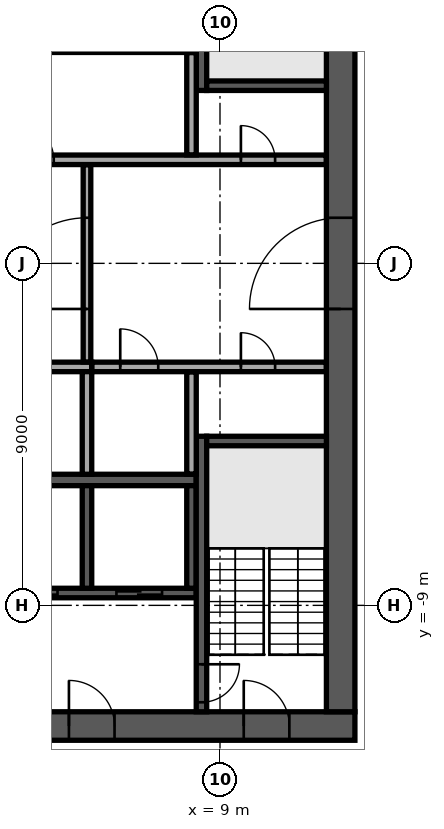
"""IFC4 building model, lengths in metres.
Left out: names, types, materials, properties, quantities, classifications, styles, units other than length and angle.
Written with IfcOpenShell. Run it as: python <this file> out.ifc"""

import sys

from ifc_helpers import new_model, si_unit, direction, frame, frame_2d, origin, place, context, subcontext, project, spatial, rectangle, extrude, element, fill, save


model = new_model("IFC4")
c1 = context("Model", 3, precision=1e-05, world=origin(), true_north=direction((0.0, 1.0)))
c2 = subcontext(c1, "Body", "Model", "MODEL_VIEW")
j1 = project(units=[si_unit("LENGTHUNIT", "METRE"), si_unit("PLANEANGLEUNIT", "RADIAN")], contexts=[c1])
p1 = place(None, origin())
s1 = spatial("IfcSite", under=j1, at=p1, CompositionType="ELEMENT")
p2 = place(p1, origin())
s2 = spatial("IfcBuilding", under=s1, at=p2, CompositionType="ELEMENT")
p3 = place(p2, frame((0.0, 0.0, 274.9)))
s3 = spatial("IfcBuildingStorey", under=s2, at=p3, CompositionType="ELEMENT", Elevation=274.9)
p4 = place(p3, frame((-12.55, -12.175, 0.0), z_axis=(0.0, 0.0, 1.0), x_axis=(1.0, 0.0, 0.0)))
e1 = element("IfcWall", 1, at=p4, inside=s3, PredefinedType="SHEAR", context=c2, shape_type="SweptSolid", body=[
    extrude(rectangle(XDim=25.1, YDim=0.75, at=frame_2d((12.55, 0.0))), origin(), (0.0, 0.0, 1.0), 3.64),
])
p5 = place(p4, frame((7.45, 0.0, 0.0)))
e2 = element("IfcOpeningElement", 2, at=p5, cuts=e1, PredefinedType="OPENING", context=c2, shape_type="SweptSolid", body=[
    extrude(rectangle(XDim=2.0, YDim=2.1, at=frame_2d((1.0, 1.05))), frame((0.0, 0.385, 0.0), z_axis=(0.0, -1.0, 0.0), x_axis=(1.0, 0.0, 0.0)), (0.0, 0.0, 1.0), 0.77),
])
p6 = place(p4, frame((17.575, 0.0, 0.0)))
e3 = element("IfcOpeningElement", 3, at=p6, cuts=e1, PredefinedType="OPENING", context=c2, shape_type="SweptSolid", body=[
    extrude(rectangle(XDim=1.2, YDim=2.1, at=frame_2d((0.6, 1.05))), frame((0.0, 0.385, 0.0), z_axis=(0.0, -1.0, 0.0), x_axis=(1.0, 0.0, 0.0)), (0.0, 0.0, 1.0), 0.77),
])
p7 = place(p4, frame((1.725, 0.0, 0.0)))
e4 = element("IfcOpeningElement", 4, at=p7, cuts=e1, PredefinedType="OPENING", context=c2, shape_type="SweptSolid", body=[
    extrude(rectangle(XDim=1.2, YDim=2.1, at=frame_2d((0.6, 1.05))), frame((0.0, 0.385, 0.0), z_axis=(0.0, -1.0, 0.0), x_axis=(1.0, 0.0, 0.0)), (0.0, 0.0, 1.0), 0.77),
])
p8 = place(p4, frame((22.175, 0.0, 0.0)))
e5 = element("IfcOpeningElement", 5, at=p8, cuts=e1, PredefinedType="OPENING", context=c2, shape_type="SweptSolid", body=[
    extrude(rectangle(XDim=1.2, YDim=2.1, at=frame_2d((0.6, 1.05))), frame((0.0, 0.385, 0.0), z_axis=(0.0, -1.0, 0.0), x_axis=(1.0, 0.0, 0.0)), (0.0, 0.0, 1.0), 0.77),
])
p9 = place(p3, frame((12.175, -11.8, 0.0), z_axis=(0.0, 0.0, 1.0), x_axis=(0.0, 1.0, 0.0)))
e6 = element("IfcWall", 6, at=p9, inside=s3, PredefinedType="SHEAR", context=c2, shape_type="SweptSolid", body=[
    extrude(rectangle(XDim=23.6, YDim=0.75, at=frame_2d((11.8, 0.0))), origin(), (0.0, 0.0, 1.0), 3.64),
])
p10 = place(p9, frame((10.6, 0.0, 0.0)))
e7 = element("IfcOpeningElement", 7, at=p10, cuts=e6, PredefinedType="OPENING", context=c2, shape_type="SweptSolid", body=[
    extrude(rectangle(XDim=2.4, YDim=2.4, at=frame_2d((1.2, 1.2))), frame((0.0, 0.385, 0.0), z_axis=(0.0, -1.0, 0.0), x_axis=(1.0, 0.0, 0.0)), (0.0, 0.0, 1.0), 0.77),
])
p11 = place(p3, frame((-8.375, 5.7, 0.0), z_axis=(0.0, 0.0, 1.0), x_axis=(1.0, 0.0, 0.0)))
e8 = element("IfcWall", 8, at=p11, inside=s3, PredefinedType="SOLIDWALL", context=c2, shape_type="SweptSolid", body=[
    extrude(rectangle(XDim=16.75, YDim=0.3, at=frame_2d((8.375, 0.0))), origin(), (0.0, 0.0, 1.0), 3.64),
])
p12 = place(p3, frame((-2.875, -5.7, 0.0), z_axis=(0.0, 0.0, 1.0), x_axis=(1.0, 0.0, 0.0)))
e9 = element("IfcWall", 9, at=p12, inside=s3, PredefinedType="SOLIDWALL", context=c2, shape_type="SweptSolid", body=[
    extrude(rectangle(XDim=11.25, YDim=0.3, at=frame_2d((5.625, 0.0))), origin(), (0.0, 0.0, 1.0), 3.64),
])
p13 = place(p3, frame((2.625, -2.725, 0.0), z_axis=(0.0, 0.0, 1.0), x_axis=(1.0, 0.0, 0.0)))
e10 = element("IfcWall", 10, at=p13, inside=s3, PredefinedType="SOLIDWALL", context=c2, shape_type="SweptSolid", body=[
    extrude(rectangle(XDim=3.0, YDim=0.25, at=frame_2d((1.5, 0.0))), origin(), (0.0, 0.0, 1.0), 3.64),
])
p14 = place(p3, frame((5.5, -5.55, 0.0), z_axis=(0.0, 0.0, 1.0), x_axis=(0.0, 1.0, 0.0)))
e11 = element("IfcWall", 11, at=p14, inside=s3, PredefinedType="SOLIDWALL", context=c2, shape_type="SweptSolid", body=[
    extrude(rectangle(XDim=2.7, YDim=0.25, at=frame_2d((1.35, 0.0))), origin(), (0.0, 0.0, 1.0), 3.64),
])
p15 = place(p3, frame((-2.875, -8.675, 0.0), z_axis=(0.0, 0.0, 1.0), x_axis=(1.0, 0.0, 0.0)))
e12 = element("IfcWall", 12, at=p15, inside=s3, PredefinedType="SOLIDWALL", context=c2, shape_type="SweptSolid", body=[
    extrude(rectangle(XDim=11.25, YDim=0.25, at=frame_2d((5.625, 0.0))), origin(), (0.0, 0.0, 1.0), 3.64),
])
p16 = place(p15, frame((0.9, 0.0, 0.0)))
e13 = element("IfcOpeningElement", 13, at=p16, cuts=e12, PredefinedType="OPENING", context=c2, shape_type="SweptSolid", body=[
    extrude(rectangle(XDim=1.2, YDim=2.1, at=frame_2d((0.6, 1.05))), frame((0.0, 0.135, 0.0), z_axis=(0.0, -1.0, 0.0), x_axis=(1.0, 0.0, 0.0)), (0.0, 0.0, 1.0), 0.27),
])
p17 = place(p15, frame((3.65, 0.0, 0.0)))
e14 = element("IfcOpeningElement", 14, at=p17, cuts=e12, PredefinedType="OPENING", context=c2, shape_type="SweptSolid", body=[
    extrude(rectangle(XDim=1.2, YDim=2.1, at=frame_2d((0.6, 1.05))), frame((0.0, 0.135, 0.0), z_axis=(0.0, -1.0, 0.0), x_axis=(1.0, 0.0, 0.0)), (0.0, 0.0, 1.0), 0.27),
])
p18 = place(p15, frame((6.4, 0.0, 0.0)))
e15 = element("IfcOpeningElement", 15, at=p18, cuts=e12, PredefinedType="OPENING", context=c2, shape_type="SweptSolid", body=[
    extrude(rectangle(XDim=1.2, YDim=2.1, at=frame_2d((0.6, 1.05))), frame((0.0, 0.135, 0.0), z_axis=(0.0, -1.0, 0.0), x_axis=(1.0, 0.0, 0.0)), (0.0, 0.0, 1.0), 0.27),
])
p19 = place(p15, frame((9.15, 0.0, 0.0)))
e16 = element("IfcOpeningElement", 16, at=p19, cuts=e12, PredefinedType="OPENING", context=c2, shape_type="SweptSolid", body=[
    extrude(rectangle(XDim=1.2, YDim=2.1, at=frame_2d((0.6, 1.05))), frame((0.0, 0.135, 0.0), z_axis=(0.0, -1.0, 0.0), x_axis=(1.0, 0.0, 0.0)), (0.0, 0.0, 1.0), 0.27),
])
for number, where, z_axis, x_axis in (
    (17, (5.5, -8.55, 0.0), (0.0, 0.0, 1.0), (0.0, 1.0, 0.0)),
    (18, (8.25, -8.55, 0.0), (0.0, 0.0, 1.0), (0.0, 1.0, 0.0)),
):
    element("IfcWall", number, at=place(p3, frame(where, z_axis=z_axis, x_axis=x_axis)), inside=s3, PredefinedType="SOLIDWALL", context=c2, shape_type="SweptSolid", body=[
        extrude(rectangle(XDim=2.7, YDim=0.25, at=frame_2d((1.35, 0.0))), origin(), (0.0, 0.0, 1.0), 3.64),
    ])
p20 = place(p3, frame((8.512, 4.55, 0.0), z_axis=(0.0, 0.0, 1.0), x_axis=(0.0, 1.0, 0.0)))
e19 = element("IfcWall", 19, at=p20, inside=s3, PredefinedType="SOLIDWALL", context=c2, shape_type="SweptSolid", body=[
    extrude(rectangle(XDim=7.25, YDim=0.275, at=frame_2d((3.625, 0.0))), origin(), (0.0, 0.0, 1.0), 3.64),
])
p21 = place(p20, frame((6.0, 0.0, 0.0)))
e20 = element("IfcOpeningElement", 20, at=p21, cuts=e19, PredefinedType="OPENING", context=c2, shape_type="SweptSolid", body=[
    extrude(rectangle(XDim=1.0, YDim=2.1, at=frame_2d((0.5, 1.05))), frame((0.0, 0.147, 0.0), z_axis=(0.0, -1.0, 0.0), x_axis=(1.0, 0.0, 0.0)), (0.0, 0.0, 1.0), 0.295),
])
p22 = place(p3, frame((8.65, 4.675, 0.0), z_axis=(0.0, 0.0, 1.0), x_axis=(1.0, 0.0, 0.0)))
e21 = element("IfcWall", 21, at=p22, inside=s3, PredefinedType="SOLIDWALL", context=c2, shape_type="SweptSolid", body=[
    extrude(rectangle(XDim=3.15, YDim=0.25, at=frame_2d((1.575, 0.0))), origin(), (0.0, 0.0, 1.0), 3.64),
])
p23 = place(p3, frame((8.512, -4.55, 0.0), z_axis=(0.0, 0.0, 1.0), x_axis=(0.0, -1.0, 0.0)))
e22 = element("IfcWall", 22, at=p23, inside=s3, PredefinedType="SOLIDWALL", context=c2, shape_type="SweptSolid", body=[
    extrude(rectangle(XDim=7.25, YDim=0.275, at=frame_2d((3.625, 0.0))), origin(), (0.0, 0.0, 1.0), 3.64),
])
p24 = place(p23, frame((6.0, 0.0, 0.0)))
e23 = element("IfcOpeningElement", 23, at=p24, cuts=e22, PredefinedType="OPENING", context=c2, shape_type="SweptSolid", body=[
    extrude(rectangle(XDim=1.0, YDim=2.1, at=frame_2d((0.5, 1.05))), frame((0.0, 0.147, 0.0), z_axis=(0.0, -1.0, 0.0), x_axis=(1.0, 0.0, 0.0)), (0.0, 0.0, 1.0), 0.295),
])
p25 = place(p3, frame((8.65, -4.675, 0.0), z_axis=(0.0, 0.0, 1.0), x_axis=(1.0, 0.0, 0.0)))
e24 = element("IfcWall", 24, at=p25, inside=s3, PredefinedType="SOLIDWALL", context=c2, shape_type="SweptSolid", body=[
    extrude(rectangle(XDim=3.15, YDim=0.25, at=frame_2d((1.575, 0.0))), origin(), (0.0, 0.0, 1.0), 3.64),
])
p26 = place(p3, frame((8.25, -5.545, 0.0), z_axis=(0.0, 0.0, 1.0), x_axis=(0.0, 1.0, 0.0)))
e25 = element("IfcWall", 25, at=p26, inside=s3, PredefinedType="PARTITIONING", context=c2, shape_type="SweptSolid", body=[
    extrude(rectangle(XDim=2.69, YDim=0.25, at=frame_2d((1.345, 0.0))), origin(), (0.0, 0.0, 1.0), 3.64),
])
p27 = place(p3, frame((5.63, -2.725, 0.0), z_axis=(0.0, 0.0, 1.0), x_axis=(1.0, 0.0, 0.0)))
e26 = element("IfcWall", 26, at=p27, inside=s3, PredefinedType="PARTITIONING", context=c2, shape_type="SweptSolid", body=[
    extrude(rectangle(XDim=6.165, YDim=0.25, at=frame_2d((3.083, 0.0))), origin(), (0.0, 0.0, 1.0), 3.64),
])
p28 = place(p27, frame((0.745, 0.0, 0.0)))
e27 = element("IfcOpeningElement", 27, at=p28, cuts=e26, PredefinedType="OPENING", context=c2, shape_type="SweptSolid", body=[
    extrude(rectangle(XDim=1.0, YDim=2.1, at=frame_2d((0.5, 1.05))), frame((0.0, 0.135, 0.0), z_axis=(0.0, -1.0, 0.0), x_axis=(1.0, 0.0, 0.0)), (0.0, 0.0, 1.0), 0.27),
])
p29 = place(p27, frame((3.92, 0.0, 0.0)))
e28 = element("IfcOpeningElement", 28, at=p29, cuts=e26, PredefinedType="OPENING", context=c2, shape_type="SweptSolid", body=[
    extrude(rectangle(XDim=0.9, YDim=2.1, at=frame_2d((0.45, 1.05))), frame((0.0, 0.135, 0.0), z_axis=(0.0, -1.0, 0.0), x_axis=(1.0, 0.0, 0.0)), (0.0, 0.0, 1.0), 0.27),
])
p30 = place(p3, frame((5.5, -2.595, 0.0), z_axis=(0.0, 0.0, 1.0), x_axis=(0.0, 1.0, 0.0)))
e29 = element("IfcWall", 29, at=p30, inside=s3, PredefinedType="PARTITIONING", context=c2, shape_type="SweptSolid", body=[
    extrude(rectangle(XDim=5.19, YDim=0.2, at=frame_2d((2.595, 0.0))), origin(), (0.0, 0.0, 1.0), 3.64),
])
p31 = place(p30, frame((1.395, 0.0, 0.0)))
e30 = element("IfcOpeningElement", 30, at=p31, cuts=e29, PredefinedType="OPENING", context=c2, shape_type="SweptSolid", body=[
    extrude(rectangle(XDim=2.4, YDim=2.4, at=frame_2d((1.2, 1.2))), frame((0.0, 0.11, 0.0), z_axis=(0.0, -1.0, 0.0), x_axis=(1.0, 0.0, 0.0)), (0.0, 0.0, 1.0), 0.22),
])
p32 = place(p3, frame((-11.795, 2.725, 0.0), z_axis=(0.0, 0.0, 1.0), x_axis=(1.0, 0.0, 0.0)))
e31 = element("IfcWall", 31, at=p32, inside=s3, PredefinedType="PARTITIONING", context=c2, shape_type="SweptSolid", body=[
    extrude(rectangle(XDim=23.59, YDim=0.25, at=frame_2d((11.795, 0.0))), origin(), (0.0, 0.0, 1.0), 3.64),
])
p33 = place(p32, frame((21.345, 0.0, 0.0)))
e32 = element("IfcOpeningElement", 32, at=p33, cuts=e31, PredefinedType="OPENING", context=c2, shape_type="SweptSolid", body=[
    extrude(rectangle(XDim=0.9, YDim=2.1, at=frame_2d((0.45, 1.05))), frame((0.0, 0.135, 0.0), z_axis=(0.0, -1.0, 0.0), x_axis=(1.0, 0.0, 0.0)), (0.0, 0.0, 1.0), 0.27),
])
p34 = place(p32, frame((1.345, 0.0, 0.0)))
e33 = element("IfcOpeningElement", 33, at=p34, cuts=e31, PredefinedType="OPENING", context=c2, shape_type="SweptSolid", body=[
    extrude(rectangle(XDim=0.9, YDim=2.1, at=frame_2d((0.45, 1.05))), frame((0.0, 0.135, 0.0), z_axis=(0.0, -1.0, 0.0), x_axis=(1.0, 0.0, 0.0)), (0.0, 0.0, 1.0), 0.27),
])
p35 = place(p32, frame((4.32, 0.0, 0.0)))
e34 = element("IfcOpeningElement", 34, at=p35, cuts=e31, PredefinedType="OPENING", context=c2, shape_type="SweptSolid", body=[
    extrude(rectangle(XDim=1.2, YDim=2.1, at=frame_2d((0.6, 1.05))), frame((0.0, 0.135, 0.0), z_axis=(0.0, -1.0, 0.0), x_axis=(1.0, 0.0, 0.0)), (0.0, 0.0, 1.0), 0.27),
])
p36 = place(p32, frame((15.42, 0.0, 0.0)))
e35 = element("IfcOpeningElement", 35, at=p36, cuts=e31, PredefinedType="OPENING", context=c2, shape_type="SweptSolid", body=[
    extrude(rectangle(XDim=1.0, YDim=2.1, at=frame_2d((0.5, 1.05))), frame((0.0, 0.135, 0.0), z_axis=(0.0, -1.0, 0.0), x_axis=(1.0, 0.0, 0.0)), (0.0, 0.0, 1.0), 0.27),
])
p37 = place(p3, frame((8.25, 2.855, 0.0), z_axis=(0.0, 0.0, 1.0), x_axis=(0.0, 1.0, 0.0)))
e36 = element("IfcWall", 36, at=p37, inside=s3, PredefinedType="PARTITIONING", context=c2, shape_type="SweptSolid", body=[
    extrude(rectangle(XDim=2.69, YDim=0.25, at=frame_2d((1.345, 0.0))), origin(), (0.0, 0.0, 1.0), 3.64),
])
p38 = place(p3, frame((9.233, -32.479, 0.0), z_axis=(0.0, 0.0, 1.0), x_axis=(0.469468429065, 0.882949259081, 0.0)))
e37 = element("IfcWall", 37, at=p38, inside=s3, PredefinedType="STANDARD", context=c2, shape_type="SweptSolid", body=[
    extrude(rectangle(XDim=48.686, YDim=0.6, at=frame_2d((24.343, 0.0))), origin(), (0.0, 0.0, 1.0), 3.64),
])
p39 = place(p38, frame((1.213, 0.0, 0.9)))
e38 = element("IfcOpeningElement", 38, at=p39, cuts=e37, PredefinedType="OPENING", context=c2, shape_type="SweptSolid", body=[
    extrude(rectangle(XDim=2.0, YDim=2.1, at=frame_2d((1.0, 1.05))), frame((0.0, 0.31, 0.0), z_axis=(0.0, -1.0, 0.0), x_axis=(1.0, 0.0, 0.0)), (0.0, 0.0, 1.0), 0.62),
])
p40 = place(p38, frame((5.639, 0.0, 0.9)))
e39 = element("IfcOpeningElement", 39, at=p40, cuts=e37, PredefinedType="OPENING", context=c2, shape_type="SweptSolid", body=[
    extrude(rectangle(XDim=2.0, YDim=2.1, at=frame_2d((1.0, 1.05))), frame((0.0, 0.31, 0.0), z_axis=(0.0, -1.0, 0.0), x_axis=(1.0, 0.0, 0.0)), (0.0, 0.0, 1.0), 0.62),
])
p41 = place(p38, frame((10.065, 0.0, 0.9)))
e40 = element("IfcOpeningElement", 40, at=p41, cuts=e37, PredefinedType="OPENING", context=c2, shape_type="SweptSolid", body=[
    extrude(rectangle(XDim=2.0, YDim=2.1, at=frame_2d((1.0, 1.05))), frame((0.0, 0.31, 0.0), z_axis=(0.0, -1.0, 0.0), x_axis=(1.0, 0.0, 0.0)), (0.0, 0.0, 1.0), 0.62),
])
p42 = place(p38, frame((14.491, 0.0, 0.9)))
e41 = element("IfcOpeningElement", 41, at=p42, cuts=e37, PredefinedType="OPENING", context=c2, shape_type="SweptSolid", body=[
    extrude(rectangle(XDim=2.0, YDim=2.1, at=frame_2d((1.0, 1.05))), frame((0.0, 0.31, 0.0), z_axis=(0.0, -1.0, 0.0), x_axis=(1.0, 0.0, 0.0)), (0.0, 0.0, 1.0), 0.62),
])
p43 = place(p38, frame((18.917, 0.0, 0.9)))
e42 = element("IfcOpeningElement", 42, at=p43, cuts=e37, PredefinedType="OPENING", context=c2, shape_type="SweptSolid", body=[
    extrude(rectangle(XDim=2.0, YDim=2.1, at=frame_2d((1.0, 1.05))), frame((0.0, 0.31, 0.0), z_axis=(0.0, -1.0, 0.0), x_axis=(1.0, 0.0, 0.0)), (0.0, 0.0, 1.0), 0.62),
])
p44 = place(p38, frame((23.343, 0.0, 0.9)))
e43 = element("IfcOpeningElement", 43, at=p44, cuts=e37, PredefinedType="OPENING", context=c2, shape_type="SweptSolid", body=[
    extrude(rectangle(XDim=2.0, YDim=2.1, at=frame_2d((1.0, 1.05))), frame((0.0, 0.31, 0.0), z_axis=(0.0, -1.0, 0.0), x_axis=(1.0, 0.0, 0.0)), (0.0, 0.0, 1.0), 0.62),
])
p45 = place(p38, frame((27.769, 0.0, 0.9)))
e44 = element("IfcOpeningElement", 44, at=p45, cuts=e37, PredefinedType="OPENING", context=c2, shape_type="SweptSolid", body=[
    extrude(rectangle(XDim=2.0, YDim=2.1, at=frame_2d((1.0, 1.05))), frame((0.0, 0.31, 0.0), z_axis=(0.0, -1.0, 0.0), x_axis=(1.0, 0.0, 0.0)), (0.0, 0.0, 1.0), 0.62),
])
p46 = place(p38, frame((32.195, 0.0, 0.9)))
e45 = element("IfcOpeningElement", 45, at=p46, cuts=e37, PredefinedType="OPENING", context=c2, shape_type="SweptSolid", body=[
    extrude(rectangle(XDim=2.0, YDim=2.1, at=frame_2d((1.0, 1.05))), frame((0.0, 0.31, 0.0), z_axis=(0.0, -1.0, 0.0), x_axis=(1.0, 0.0, 0.0)), (0.0, 0.0, 1.0), 0.62),
])
p47 = place(p38, frame((36.621, 0.0, 0.9)))
e46 = element("IfcOpeningElement", 46, at=p47, cuts=e37, PredefinedType="OPENING", context=c2, shape_type="SweptSolid", body=[
    extrude(rectangle(XDim=2.0, YDim=2.1, at=frame_2d((1.0, 1.05))), frame((0.0, 0.31, 0.0), z_axis=(0.0, -1.0, 0.0), x_axis=(1.0, 0.0, 0.0)), (0.0, 0.0, 1.0), 0.62),
])
p48 = place(p38, frame((41.047, 0.0, 0.9)))
e47 = element("IfcOpeningElement", 47, at=p48, cuts=e37, PredefinedType="OPENING", context=c2, shape_type="SweptSolid", body=[
    extrude(rectangle(XDim=2.0, YDim=2.1, at=frame_2d((1.0, 1.05))), frame((0.0, 0.31, 0.0), z_axis=(0.0, -1.0, 0.0), x_axis=(1.0, 0.0, 0.0)), (0.0, 0.0, 1.0), 0.62),
])
p49 = place(p38, frame((45.473, 0.0, 0.9)))
e48 = element("IfcOpeningElement", 48, at=p49, cuts=e37, PredefinedType="OPENING", context=c2, shape_type="SweptSolid", body=[
    extrude(rectangle(XDim=2.0, YDim=2.1, at=frame_2d((1.0, 1.05))), frame((0.0, 0.31, 0.0), z_axis=(0.0, -1.0, 0.0), x_axis=(1.0, 0.0, 0.0)), (0.0, 0.0, 1.0), 0.62),
])
p50 = place(p3, frame((-26.271, -7.606, 0.0), z_axis=(0.0, 0.0, 1.0), x_axis=(0.882946860375, -0.469472940385, 0.0)))
e49 = element("IfcWall", 49, at=p50, inside=s3, PredefinedType="PARTITIONING", context=c2, shape_type="SweptSolid", body=[
    extrude(rectangle(XDim=39.325, YDim=0.15, at=frame_2d((19.662, 0.0))), origin(), (0.0, 0.0, 1.0), 3.04),
])
p51 = place(p50, frame((2.8, 0.0, 0.0)))
e50 = element("IfcOpeningElement", 50, at=p51, cuts=e49, PredefinedType="OPENING", context=c2, shape_type="SweptSolid", body=[
    extrude(rectangle(XDim=1.0, YDim=2.1, at=frame_2d((0.5, 1.05))), frame((0.0, 0.085, 0.0), z_axis=(0.0, -1.0, 0.0), x_axis=(1.0, 0.0, 0.0)), (0.0, 0.0, 1.0), 0.17),
])
p52 = place(p50, frame((6.915, 0.0, 0.0)))
e51 = element("IfcOpeningElement", 51, at=p52, cuts=e49, PredefinedType="OPENING", context=c2, shape_type="SweptSolid", body=[
    extrude(rectangle(XDim=1.0, YDim=2.1, at=frame_2d((0.5, 1.05))), frame((0.0, 0.085, 0.0), z_axis=(0.0, -1.0, 0.0), x_axis=(1.0, 0.0, 0.0)), (0.0, 0.0, 1.0), 0.17),
])
p53 = place(p50, frame((14.499, 0.0, 0.0)))
e52 = element("IfcOpeningElement", 52, at=p53, cuts=e49, PredefinedType="OPENING", context=c2, shape_type="SweptSolid", body=[
    extrude(rectangle(XDim=1.0, YDim=2.1, at=frame_2d((0.5, 1.05))), frame((0.0, 0.085, 0.0), z_axis=(0.0, -1.0, 0.0), x_axis=(1.0, 0.0, 0.0)), (0.0, 0.0, 1.0), 0.17),
])
p54 = place(p50, frame((25.785, 0.0, 0.0)))
e53 = element("IfcOpeningElement", 53, at=p54, cuts=e49, PredefinedType="OPENING", context=c2, shape_type="SweptSolid", body=[
    extrude(rectangle(XDim=1.0, YDim=2.1, at=frame_2d((0.5, 1.05))), frame((0.0, 0.085, 0.0), z_axis=(0.0, -1.0, 0.0), x_axis=(1.0, 0.0, 0.0)), (0.0, 0.0, 1.0), 0.17),
])
p55 = place(p50, frame((37.741, 0.0, 0.0)))
e54 = element("IfcOpeningElement", 54, at=p55, cuts=e49, PredefinedType="OPENING", context=c2, shape_type="SweptSolid", body=[
    extrude(rectangle(XDim=1.0, YDim=2.1, at=frame_2d((0.5, 1.05))), frame((0.0, 0.085, 0.0), z_axis=(0.0, -1.0, 0.0), x_axis=(1.0, 0.0, 0.0)), (0.0, 0.0, 1.0), 0.17),
])
p56 = place(p6, origin())
e55 = element("IfcDoor", 55, at=p56, inside=s3, OperationType="SINGLE_SWING_LEFT", PredefinedType="DOOR", context=c2, shape_type="SweptSolid", body=[
    extrude(rectangle(XDim=1.2, YDim=2.1, at=frame_2d((0.6, 1.05))), frame((0.0, 0.025, 0.0), z_axis=(0.0, -1.0, 0.0), x_axis=(1.0, 0.0, 0.0)), (0.0, 0.0, 1.0), 0.05),
])
fill(e3, e55)
p57 = place(p8, origin())
e56 = element("IfcDoor", 56, at=p57, inside=s3, OperationType="SINGLE_SWING_LEFT", PredefinedType="DOOR", context=c2, shape_type="SweptSolid", body=[
    extrude(rectangle(XDim=1.2, YDim=2.1, at=frame_2d((0.6, 1.05))), frame((0.0, 0.025, 0.0), z_axis=(0.0, -1.0, 0.0), x_axis=(1.0, 0.0, 0.0)), (0.0, 0.0, 1.0), 0.05),
])
fill(e5, e56)
p58 = place(p10, origin())
e57 = element("IfcDoor", 57, at=p58, inside=s3, OperationType="SINGLE_SWING_LEFT", PredefinedType="DOOR", context=c2, shape_type="SweptSolid", body=[
    extrude(rectangle(XDim=2.4, YDim=2.4, at=frame_2d((1.2, 1.2))), frame((0.0, 0.025, 0.0), z_axis=(0.0, -1.0, 0.0), x_axis=(1.0, 0.0, 0.0)), (0.0, 0.0, 1.0), 0.05),
])
fill(e7, e57)
p59 = place(p18, origin())
e58 = element("IfcDoor", 58, at=p59, inside=s3, OperationType="DOUBLE_DOOR_SLIDING", PredefinedType="DOOR", context=c2, shape_type="SweptSolid", body=[
    extrude(rectangle(XDim=1.2, YDim=2.1, at=frame_2d((0.6, 1.05))), frame((0.0, 0.025, 0.0), z_axis=(0.0, -1.0, 0.0), x_axis=(1.0, 0.0, 0.0)), (0.0, 0.0, 1.0), 0.05),
])
fill(e15, e58)
p60 = place(p19, origin())
e59 = element("IfcDoor", 59, at=p60, inside=s3, OperationType="DOUBLE_DOOR_SLIDING", PredefinedType="DOOR", context=c2, shape_type="SweptSolid", body=[
    extrude(rectangle(XDim=1.2, YDim=2.1, at=frame_2d((0.6, 1.05))), frame((0.0, 0.025, 0.0), z_axis=(0.0, -1.0, 0.0), x_axis=(1.0, 0.0, 0.0)), (0.0, 0.0, 1.0), 0.05),
])
fill(e16, e59)
p61 = place(p24, origin())
e60 = element("IfcDoor", 60, at=p61, inside=s3, OperationType="SINGLE_SWING_LEFT", PredefinedType="DOOR", context=c2, shape_type="SweptSolid", body=[
    extrude(rectangle(XDim=1.0, YDim=2.1, at=frame_2d((0.5, 1.05))), frame((0.0, 0.025, 0.0), z_axis=(0.0, -1.0, 0.0), x_axis=(1.0, 0.0, 0.0)), (0.0, 0.0, 1.0), 0.05),
])
fill(e23, e60)
p62 = place(p28, origin())
e61 = element("IfcDoor", 61, at=p62, inside=s3, OperationType="SINGLE_SWING_RIGHT", PredefinedType="DOOR", context=c2, shape_type="SweptSolid", body=[
    extrude(rectangle(XDim=1.0, YDim=2.1, at=frame_2d((0.5, 1.05))), frame((0.0, 0.025, 0.0), z_axis=(0.0, -1.0, 0.0), x_axis=(1.0, 0.0, 0.0)), (0.0, 0.0, 1.0), 0.05),
])
fill(e27, e61)
p63 = place(p33, origin())
e62 = element("IfcDoor", 62, at=p63, inside=s3, OperationType="SINGLE_SWING_RIGHT", PredefinedType="DOOR", context=c2, shape_type="SweptSolid", body=[
    extrude(rectangle(XDim=0.9, YDim=2.1, at=frame_2d((0.45, 1.05))), frame((0.0, 0.025, 0.0), z_axis=(0.0, -1.0, 0.0), x_axis=(1.0, 0.0, 0.0)), (0.0, 0.0, 1.0), 0.05),
])
fill(e32, e62)
p64 = place(p29, origin())
e63 = element("IfcDoor", 63, at=p64, inside=s3, OperationType="SINGLE_SWING_RIGHT", PredefinedType="DOOR", context=c2, shape_type="SweptSolid", body=[
    extrude(rectangle(XDim=0.9, YDim=2.1, at=frame_2d((0.45, 1.05))), frame((0.0, 0.025, 0.0), z_axis=(0.0, -1.0, 0.0), x_axis=(1.0, 0.0, 0.0)), (0.0, 0.0, 1.0), 0.05),
])
fill(e28, e63)
p65 = place(p36, origin())
e64 = element("IfcDoor", 64, at=p65, inside=s3, OperationType="SINGLE_SWING_RIGHT", PredefinedType="DOOR", context=c2, shape_type="SweptSolid", body=[
    extrude(rectangle(XDim=1.0, YDim=2.1, at=frame_2d((0.5, 1.05))), frame((0.0, 0.025, 0.0), z_axis=(0.0, -1.0, 0.0), x_axis=(1.0, 0.0, 0.0)), (0.0, 0.0, 1.0), 0.05),
])
fill(e35, e64)
p66 = place(p31, origin())
e65 = element("IfcDoor", 65, at=p66, inside=s3, OperationType="DOUBLE_DOOR_DOUBLE_SWING", PredefinedType="DOOR", context=c2, shape_type="SweptSolid", body=[
    extrude(rectangle(XDim=2.4, YDim=2.4, at=frame_2d((1.2, 1.2))), frame((0.0, 0.025, 0.0), z_axis=(0.0, -1.0, 0.0), x_axis=(1.0, 0.0, 0.0)), (0.0, 0.0, 1.0), 0.05),
])
fill(e30, e65)
save(model, sys.argv[1])
